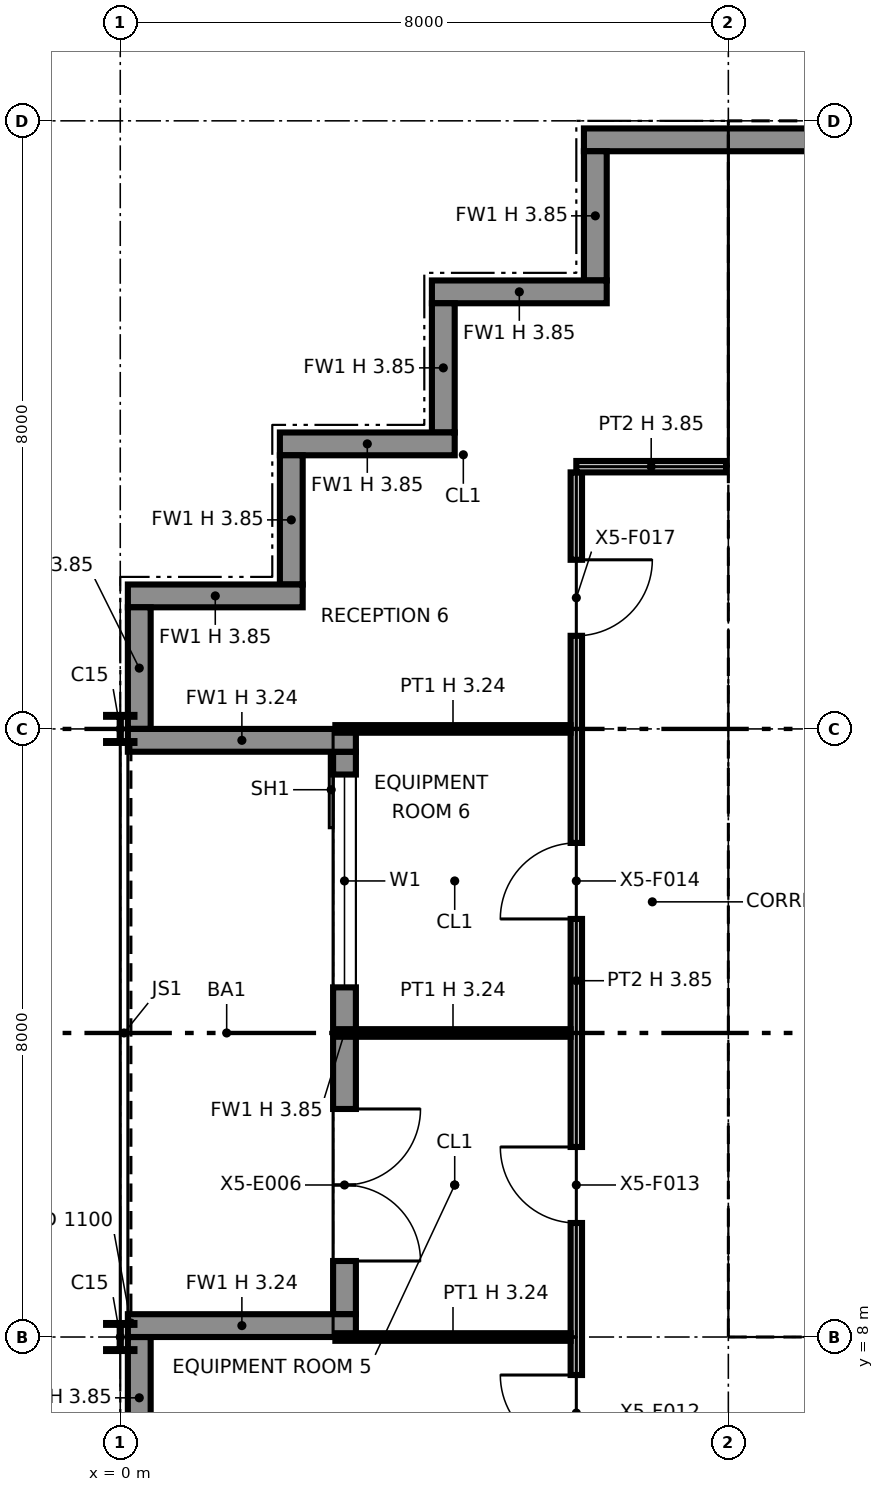
"""IFC4 building model, lengths in metres.
Left out: names, types, materials, properties, quantities, classifications, styles, units other than length and angle.
Written with IfcOpenShell. Run it as: python <this file> out.ifc"""

import sys

from ifc_helpers import new_model, si_unit, direction, frame, frame_2d, origin, origin_2d, place, context, subcontext, project, spatial, polyline, rectangle, i_section, outline, extrude, element, fill, save


model = new_model("IFC4")
c1 = context("Model", 3, precision=1e-05, world=origin(), true_north=direction((0.0, 1.0)))
c2 = subcontext(c1, "Body", "Model", "MODEL_VIEW")
j1 = project(units=[si_unit("LENGTHUNIT", "METRE"), si_unit("PLANEANGLEUNIT", "RADIAN")], contexts=[c1])
p1 = place(None, origin())
s1 = spatial("IfcSite", under=j1, at=p1, CompositionType="ELEMENT")
p2 = place(p1, origin())
s2 = spatial("IfcBuilding", under=s1, at=p2, CompositionType="ELEMENT")
p3 = place(p2, frame((0.0, 0.0, 283.0)))
s3 = spatial("IfcBuildingStorey", under=s2, at=p3, CompositionType="ELEMENT", Elevation=283.0)
for number, where, z_axis, x_axis in (
    (1, (0.0, 8.0, 0.0), (0.0, 0.0, 1.0), (1.0, 0.0, 0.0)),
    (2, (0.0, 16.0, 0.0), (0.0, 0.0, 1.0), (1.0, 0.0, 0.0)),
):
    element("IfcColumn", number, at=place(p3, frame(where, z_axis=z_axis, x_axis=x_axis)), inside=s3, PredefinedType="COLUMN", context=c2, shape_type="SweptSolid", body=[
        extrude(i_section(OverallWidth=0.373, OverallDepth=0.368, WebThickness=0.015, FlangeThickness=0.024, at=origin_2d()), origin(), (0.0, 0.0, 1.0), 3.85),
    ])
for number, where, z_axis, x_axis in (
    (3, (8.0, 8.0, 0.0), (0.0, 0.0, 1.0), (1.0, 0.0, 0.0)),
    (4, (8.0, 16.0, 0.0), (0.0, 0.0, 1.0), (1.0, 0.0, 0.0)),
):
    element("IfcColumn", number, at=place(p3, frame(where, z_axis=z_axis, x_axis=x_axis)), inside=s3, PredefinedType="COLUMN", context=c2, shape_type="SweptSolid", body=[
        extrude(i_section(OverallWidth=0.257, OverallDepth=0.363, WebThickness=0.013, FlangeThickness=0.022, at=origin_2d()), origin(), (0.0, 0.0, 1.0), 3.85),
    ])
p4 = place(p3, frame((8.0, 24.0, 0.0), z_axis=(0.0, 0.0, 1.0), x_axis=(1.0, 0.0, 0.0)))
e5 = element("IfcColumn", 5, at=p4, inside=s3, PredefinedType="COLUMN", context=c2, shape_type="SweptSolid", body=[
    extrude(i_section(OverallWidth=0.399, OverallDepth=0.386, WebThickness=0.021, FlangeThickness=0.033, at=origin_2d()), origin(), (0.0, 0.0, 1.0), 3.85),
])
p5 = place(p3, frame((32.0, 23.75, 0.0), z_axis=(0.0, 0.0, 1.0), x_axis=(-1.0, 0.0, 0.0)))
e6 = element("IfcWall", 6, at=p5, inside=s3, PredefinedType="SOLIDWALL", context=c2, shape_type="SweptSolid", body=[
    extrude(rectangle(XDim=25.9, YDim=0.3, at=frame_2d((12.95, 0.0))), origin(), (0.0, 0.0, 1.0), 3.85),
])
p6 = place(p3, frame((6.25, 23.6, 0.0), z_axis=(0.0, 0.0, 1.0), x_axis=(0.0, -1.0, 0.0)))
e7 = element("IfcWall", 7, at=p6, inside=s3, PredefinedType="SOLIDWALL", context=c2, shape_type="SweptSolid", body=[
    extrude(rectangle(XDim=1.7, YDim=0.3, at=frame_2d((0.85, 0.0))), origin(), (0.0, 0.0, 1.0), 3.85),
])
p7 = place(p3, frame((6.4, 21.75, 0.0), z_axis=(0.0, 0.0, 1.0), x_axis=(-1.0, 0.0, 0.0)))
e8 = element("IfcWall", 8, at=p7, inside=s3, PredefinedType="SOLIDWALL", context=c2, shape_type="SweptSolid", body=[
    extrude(rectangle(XDim=2.3, YDim=0.3, at=frame_2d((1.15, 0.0))), origin(), (0.0, 0.0, 1.0), 3.85),
])
p8 = place(p3, frame((4.25, 21.6, 0.0), z_axis=(0.0, 0.0, 1.0), x_axis=(0.0, -1.0, 0.0)))
e9 = element("IfcWall", 9, at=p8, inside=s3, PredefinedType="SOLIDWALL", context=c2, shape_type="SweptSolid", body=[
    extrude(rectangle(XDim=1.7, YDim=0.3, at=frame_2d((0.85, 0.0))), origin(), (0.0, 0.0, 1.0), 3.85),
])
p9 = place(p3, frame((4.4, 19.75, 0.0), z_axis=(0.0, 0.0, 1.0), x_axis=(-1.0, 0.0, 0.0)))
e10 = element("IfcWall", 10, at=p9, inside=s3, PredefinedType="SOLIDWALL", context=c2, shape_type="SweptSolid", body=[
    extrude(rectangle(XDim=2.3, YDim=0.3, at=frame_2d((1.15, 0.0))), origin(), (0.0, 0.0, 1.0), 3.85),
])
p10 = place(p3, frame((2.25, 19.6, 0.0), z_axis=(0.0, 0.0, 1.0), x_axis=(0.0, -1.0, 0.0)))
e11 = element("IfcWall", 11, at=p10, inside=s3, PredefinedType="SOLIDWALL", context=c2, shape_type="SweptSolid", body=[
    extrude(rectangle(XDim=1.7, YDim=0.3, at=frame_2d((0.85, 0.0))), origin(), (0.0, 0.0, 1.0), 3.85),
])
p11 = place(p3, frame((2.4, 17.75, 0.0), z_axis=(0.0, 0.0, 1.0), x_axis=(-1.0, 0.0, 0.0)))
e12 = element("IfcWall", 12, at=p11, inside=s3, PredefinedType="SOLIDWALL", context=c2, shape_type="SweptSolid", body=[
    extrude(rectangle(XDim=2.3, YDim=0.3, at=frame_2d((1.15, 0.0))), origin(), (0.0, 0.0, 1.0), 3.85),
])
p12 = place(p3, frame((0.25, 17.6, 0.0), z_axis=(0.0, 0.0, 1.0), x_axis=(0.0, -1.0, 0.0)))
e13 = element("IfcWall", 13, at=p12, inside=s3, PredefinedType="SOLIDWALL", context=c2, shape_type="SweptSolid", body=[
    extrude(rectangle(XDim=1.6, YDim=0.3, at=frame_2d((0.8, 0.0))), origin(), (0.0, 0.0, 1.0), 3.85),
])
p13 = place(p3, frame((2.95, 15.7, 0.0), z_axis=(0.0, 0.0, 1.0), x_axis=(0.0, -1.0, 0.0)))
e14 = element("IfcWall", 14, at=p13, inside=s3, PredefinedType="SOLIDWALL", context=c2, shape_type="SweptSolid", body=[
    extrude(rectangle(XDim=7.4, YDim=0.3, at=frame_2d((3.7, 0.0))), origin(), (0.0, 0.0, 1.0), 3.85),
])
p14 = place(p13, frame((0.3, 0.0, 0.9)))
e15 = element("IfcOpeningElement", 15, at=p14, cuts=e14, PredefinedType="OPENING", context=c2, shape_type="SweptSolid", body=[
    extrude(rectangle(XDim=2.8, YDim=2.2, at=frame_2d((1.4, 1.1))), frame((0.0, 0.16, 0.0), z_axis=(0.0, -1.0, 0.0), x_axis=(1.0, 0.0, 0.0)), (0.0, 0.0, 1.0), 0.32),
])
p15 = place(p13, frame((4.7, 0.0, 0.0)))
e16 = element("IfcOpeningElement", 16, at=p15, cuts=e14, PredefinedType="OPENING", context=c2, shape_type="SweptSolid", body=[
    extrude(rectangle(XDim=2.0, YDim=2.4, at=frame_2d((1.0, 1.2))), frame((0.0, 0.16, 0.0), z_axis=(0.0, -1.0, 0.0), x_axis=(1.0, 0.0, 0.0)), (0.0, 0.0, 1.0), 0.32),
])
for number, where, z_axis, x_axis in (
    (17, (0.1, 15.85, 0.0), (0.0, 0.0, 1.0), (1.0, 0.0, 0.0)),
    (18, (0.1, 8.15, 0.0), (0.0, 0.0, 1.0), (1.0, 0.0, 0.0)),
):
    element("IfcWall", number, at=place(p3, frame(where, z_axis=z_axis, x_axis=x_axis)), inside=s3, PredefinedType="SOLIDWALL", context=c2, shape_type="SweptSolid", body=[
        extrude(rectangle(XDim=3.0, YDim=0.3, at=frame_2d((1.5, 0.0))), origin(), (0.0, 0.0, 1.0), 3.237),
    ])
p16 = place(p3, frame((0.25, 8.0, 0.0), z_axis=(0.0, 0.0, 1.0), x_axis=(0.0, -1.0, 0.0)))
e19 = element("IfcWall", 19, at=p16, inside=s3, PredefinedType="SOLIDWALL", context=c2, shape_type="SweptSolid", body=[
    extrude(rectangle(XDim=1.6, YDim=0.3, at=frame_2d((0.8, 0.0))), origin(), (0.0, 0.0, 1.0), 3.85),
])
p17 = place(p3, frame((8.65, 8.75, 0.0), z_axis=(0.0, 0.0, 1.0), x_axis=(1.0, 0.0, 0.0)))
e20 = element("IfcWall", 20, at=p17, inside=s3, PredefinedType="PARTITIONING", context=c2, shape_type="SweptSolid", body=[
    extrude(outline(polyline([(0.0, 0.0), (14.7, 0.0), (14.7, 3.85), (7.438, 3.85), (7.437, 3.318), (7.263, 3.318), (7.262, 3.85), (0.0, 3.85), (0.0, 0.0)])), frame((0.0, 0.1, 0.0), z_axis=(0.0, -1.0, 0.0), x_axis=(1.0, 0.0, 0.0)), (0.0, 0.0, 1.0), 0.2),
])
p18 = place(p17, frame((1.3, 0.0, 0.0)))
e21 = element("IfcOpeningElement", 21, at=p18, cuts=e20, PredefinedType="OPENING", context=c2, shape_type="SweptSolid", body=[
    extrude(rectangle(XDim=1.4, YDim=2.1, at=frame_2d((0.7, 1.05))), frame((0.0, 0.11, 0.0), z_axis=(0.0, -1.0, 0.0), x_axis=(1.0, 0.0, 0.0)), (0.0, 0.0, 1.0), 0.22),
])
p19 = place(p17, frame((4.6, 0.0, 0.0)))
e22 = element("IfcOpeningElement", 22, at=p19, cuts=e20, PredefinedType="OPENING", context=c2, shape_type="SweptSolid", body=[
    extrude(rectangle(XDim=1.4, YDim=2.1, at=frame_2d((0.7, 1.05))), frame((0.0, 0.11, 0.0), z_axis=(0.0, -1.0, 0.0), x_axis=(1.0, 0.0, 0.0)), (0.0, 0.0, 1.0), 0.22),
])
p20 = place(p17, frame((10.4, 0.0, 0.0)))
e23 = element("IfcOpeningElement", 23, at=p20, cuts=e20, PredefinedType="OPENING", context=c2, shape_type="SweptSolid", body=[
    extrude(rectangle(XDim=1.2, YDim=2.1, at=frame_2d((0.6, 1.05))), frame((0.0, 0.11, 0.0), z_axis=(0.0, -1.0, 0.0), x_axis=(1.0, 0.0, 0.0)), (0.0, 0.0, 1.0), 0.22),
])
p21 = place(p3, frame((8.75, 8.85, 0.0), z_axis=(0.0, 0.0, 1.0), x_axis=(0.0, 1.0, 0.0)))
e24 = element("IfcWall", 24, at=p21, inside=s3, PredefinedType="PARTITIONING", context=c2, shape_type="SweptSolid", body=[
    extrude(outline(polyline([(0.0, 0.0), (14.3, 0.0), (14.3, 3.85), (10.225, 3.85), (10.224, 3.44), (10.076, 3.44), (10.075, 3.85), (7.238, 3.85), (7.237, 3.318), (7.063, 3.318), (7.062, 3.85), (0.0, 3.85), (0.0, 0.0)])), frame((0.0, 0.1, 0.0), z_axis=(0.0, -1.0, 0.0), x_axis=(1.0, 0.0, 0.0)), (0.0, 0.0, 1.0), 0.2),
])
p22 = place(p21, frame((8.3, 0.0, 0.0)))
e25 = element("IfcOpeningElement", 25, at=p22, cuts=e24, PredefinedType="OPENING", context=c2, shape_type="SweptSolid", body=[
    extrude(rectangle(XDim=1.8, YDim=2.1, at=frame_2d((0.9, 1.05))), frame((0.0, 0.11, 0.0), z_axis=(0.0, -1.0, 0.0), x_axis=(1.0, 0.0, 0.0)), (0.0, 0.0, 1.0), 0.22),
])
p23 = place(p3, frame((8.65, 23.25, 0.0), z_axis=(0.0, 0.0, 1.0), x_axis=(1.0, 0.0, 0.0)))
e26 = element("IfcWall", 26, at=p23, inside=s3, PredefinedType="PARTITIONING", context=c2, shape_type="SweptSolid", body=[
    extrude(outline(polyline([(0.0, 0.0), (14.7, 0.0), (14.7, 3.85), (7.438, 3.85), (7.437, 3.318), (7.263, 3.318), (7.262, 3.85), (0.0, 3.85), (0.0, 0.0)])), frame((0.0, 0.1, 0.0), z_axis=(0.0, -1.0, 0.0), x_axis=(1.0, 0.0, 0.0)), (0.0, 0.0, 1.0), 0.2),
])
p24 = place(p3, frame((8.85, 16.0, 0.0), z_axis=(0.0, 0.0, 1.0), x_axis=(1.0, 0.0, 0.0)))
e27 = element("IfcWall", 27, at=p24, inside=s3, PredefinedType="PARTITIONING", context=c2, shape_type="SweptSolid", body=[
    extrude(rectangle(XDim=6.958, YDim=0.6, at=frame_2d((3.479, 0.0))), origin(), (0.0, 0.0, 1.0), 3.318),
])
p25 = place(p3, frame((8.85, 19.9, 0.0), z_axis=(0.0, 0.0, 1.0), x_axis=(1.0, 0.0, 0.0)))
e28 = element("IfcWall", 28, at=p25, inside=s3, PredefinedType="PARTITIONING", context=c2, shape_type="SweptSolid", body=[
    extrude(outline(polyline([(0.0, 0.0), (14.3, 0.0), (14.3, 3.85), (7.238, 3.85), (7.237, 3.318), (7.063, 3.318), (7.062, 3.85), (0.0, 3.85), (0.0, 0.0)])), frame((0.0, 0.1, 0.0), z_axis=(0.0, -1.0, 0.0), x_axis=(1.0, 0.0, 0.0)), (0.0, 0.0, 1.0), 0.2),
])
p26 = place(p25, frame((2.125, 0.0, 0.0)))
e29 = element("IfcOpeningElement", 29, at=p26, cuts=e28, PredefinedType="OPENING", context=c2, shape_type="SweptSolid", body=[
    extrude(rectangle(XDim=0.9, YDim=2.1, at=frame_2d((0.45, 1.05))), frame((0.0, 0.11, 0.0), z_axis=(0.0, -1.0, 0.0), x_axis=(1.0, 0.0, 0.0)), (0.0, 0.0, 1.0), 0.22),
])
p27 = place(p25, frame((5.65, 0.0, 0.0)))
e30 = element("IfcOpeningElement", 30, at=p27, cuts=e28, PredefinedType="OPENING", context=c2, shape_type="SweptSolid", body=[
    extrude(rectangle(XDim=1.1, YDim=2.1, at=frame_2d((0.55, 1.05))), frame((0.0, 0.11, 0.0), z_axis=(0.0, -1.0, 0.0), x_axis=(1.0, 0.0, 0.0)), (0.0, 0.0, 1.0), 0.22),
])
p28 = place(p25, frame((7.95, 0.0, 0.0)))
e31 = element("IfcOpeningElement", 31, at=p28, cuts=e28, PredefinedType="OPENING", context=c2, shape_type="SweptSolid", body=[
    extrude(rectangle(XDim=1.1, YDim=2.1, at=frame_2d((0.55, 1.05))), frame((0.0, 0.11, 0.0), z_axis=(0.0, -1.0, 0.0), x_axis=(1.0, 0.0, 0.0)), (0.0, 0.0, 1.0), 0.22),
])
p29 = place(p25, frame((10.25, 0.0, 0.0)))
e32 = element("IfcOpeningElement", 32, at=p29, cuts=e28, PredefinedType="OPENING", context=c2, shape_type="SweptSolid", body=[
    extrude(rectangle(XDim=1.1, YDim=2.1, at=frame_2d((0.55, 1.05))), frame((0.0, 0.11, 0.0), z_axis=(0.0, -1.0, 0.0), x_axis=(1.0, 0.0, 0.0)), (0.0, 0.0, 1.0), 0.22),
])
p30 = place(p25, frame((12.625, 0.0, 0.0)))
e33 = element("IfcOpeningElement", 33, at=p30, cuts=e28, PredefinedType="OPENING", context=c2, shape_type="SweptSolid", body=[
    extrude(rectangle(XDim=1.1, YDim=2.1, at=frame_2d((0.55, 1.05))), frame((0.0, 0.11, 0.0), z_axis=(0.0, -1.0, 0.0), x_axis=(1.0, 0.0, 0.0)), (0.0, 0.0, 1.0), 0.22),
])
p31 = place(p3, frame((6.0, 6.0, 0.0), z_axis=(0.0, 0.0, 1.0), x_axis=(0.0, 1.0, 0.0)))
e34 = element("IfcWall", 34, at=p31, inside=s3, PredefinedType="PARTITIONING", context=c2, shape_type="SweptSolid", body=[
    extrude(outline(polyline([(0.0, 0.0), (13.375, 0.0), (13.375, 3.85), (10.3, 3.85), (10.298, 3.238), (9.702, 3.238), (9.7, 3.85), (6.3, 3.85), (6.298, 3.238), (5.702, 3.238), (5.7, 3.85), (2.3, 3.85), (2.298, 3.238), (1.702, 3.238), (1.7, 3.85), (0.0, 3.85), (0.0, 0.0)])), frame((0.0, 0.075, 0.0), z_axis=(0.0, -1.0, 0.0), x_axis=(1.0, 0.0, 0.0)), (0.0, 0.0, 1.0), 0.15),
])
p32 = place(p31, frame((0.5, 0.0, 0.0)))
e35 = element("IfcOpeningElement", 35, at=p32, cuts=e34, PredefinedType="OPENING", context=c2, shape_type="SweptSolid", body=[
    extrude(rectangle(XDim=1.0, YDim=2.1, at=frame_2d((0.5, 1.05))), frame((0.0, 0.085, 0.0), z_axis=(0.0, -1.0, 0.0), x_axis=(1.0, 0.0, 0.0)), (0.0, 0.0, 1.0), 0.17),
])
p33 = place(p31, frame((3.5, 0.0, 0.0)))
e36 = element("IfcOpeningElement", 36, at=p33, cuts=e34, PredefinedType="OPENING", context=c2, shape_type="SweptSolid", body=[
    extrude(rectangle(XDim=1.0, YDim=2.1, at=frame_2d((0.5, 1.05))), frame((0.0, 0.085, 0.0), z_axis=(0.0, -1.0, 0.0), x_axis=(1.0, 0.0, 0.0)), (0.0, 0.0, 1.0), 0.17),
])
p34 = place(p31, frame((7.5, 0.0, 0.0)))
e37 = element("IfcOpeningElement", 37, at=p34, cuts=e34, PredefinedType="OPENING", context=c2, shape_type="SweptSolid", body=[
    extrude(rectangle(XDim=1.0, YDim=2.1, at=frame_2d((0.5, 1.05))), frame((0.0, 0.085, 0.0), z_axis=(0.0, -1.0, 0.0), x_axis=(1.0, 0.0, 0.0)), (0.0, 0.0, 1.0), 0.17),
])
p35 = place(p31, frame((12.225, 0.0, 0.0), z_axis=(0.0, 0.0, 1.0), x_axis=(-1.0, 0.0, 0.0)))
e38 = element("IfcOpeningElement", 38, at=p35, cuts=e34, PredefinedType="OPENING", context=c2, shape_type="SweptSolid", body=[
    extrude(rectangle(XDim=1.0, YDim=2.1, at=frame_2d((0.5, 1.05))), frame((0.0, 0.085, 0.0), z_axis=(0.0, -1.0, 0.0), x_axis=(1.0, 0.0, 0.0)), (0.0, 0.0, 1.0), 0.17),
])
for number, where, z_axis, x_axis in (
    (39, (2.83, 8.0, 0.0), (0.0, 0.0, 1.0), (1.0, 0.0, 0.0)),
    (40, (2.83, 12.0, 0.0), (0.0, 0.0, 1.0), (1.0, 0.0, 0.0)),
    (41, (2.83, 16.0, 0.0), (0.0, 0.0, 1.0), (1.0, 0.0, 0.0)),
):
    element("IfcWall", number, at=place(p3, frame(where, z_axis=z_axis, x_axis=x_axis)), inside=s3, PredefinedType="PARTITIONING", context=c2, shape_type="SweptSolid", body=[
        extrude(rectangle(XDim=3.095, YDim=0.1, at=frame_2d((1.547, 0.0))), origin(), (0.0, 0.0, 1.0), 3.238),
    ])
p36 = place(p3, frame((6.0, 19.45, 0.0), z_axis=(0.0, 0.0, 1.0), x_axis=(1.0, 0.0, 0.0)))
e42 = element("IfcWall", 42, at=p36, inside=s3, PredefinedType="PARTITIONING", context=c2, shape_type="SweptSolid", body=[
    extrude(rectangle(XDim=1.97, YDim=0.15, at=frame_2d((0.985, 0.0))), origin(), (0.0, 0.0, 1.0), 3.85),
])
p37 = place(p14, origin())
e43 = element("IfcWindow", 43, at=p37, inside=s3, PartitioningType="SINGLE_PANEL", PredefinedType="WINDOW", context=c2, shape_type="SweptSolid", body=[
    extrude(rectangle(XDim=2.8, YDim=2.2, at=frame_2d((1.4, 1.1))), frame((0.0, 0.03, 0.0), z_axis=(0.0, -1.0, 0.0), x_axis=(1.0, 0.0, 0.0)), (0.0, 0.0, 1.0), 0.06),
])
fill(e15, e43)
p38 = place(p15, origin())
e44 = element("IfcDoor", 44, at=p38, inside=s3, OperationType="DOUBLE_DOOR_SINGLE_SWING", PredefinedType="DOOR", context=c2, shape_type="SweptSolid", body=[
    extrude(rectangle(XDim=2.0, YDim=2.4, at=frame_2d((1.0, 1.2))), frame((0.0, 0.025, 0.0), z_axis=(0.0, -1.0, 0.0), x_axis=(1.0, 0.0, 0.0)), (0.0, 0.0, 1.0), 0.05),
])
fill(e16, e44)
p39 = place(p22, origin())
e45 = element("IfcDoor", 45, at=p39, inside=s3, OperationType="DOUBLE_DOOR_SINGLE_SWING", PredefinedType="NOTDEFINED", context=c2, shape_type="SweptSolid", body=[
    extrude(rectangle(XDim=1.8, YDim=2.1, at=frame_2d((0.9, 1.05))), frame((0.0, 0.025, 0.0), z_axis=(0.0, -1.0, 0.0), x_axis=(1.0, 0.0, 0.0)), (0.0, 0.0, 1.0), 0.05),
])
fill(e25, e45)
p40 = place(p32, origin())
e46 = element("IfcDoor", 46, at=p40, inside=s3, OperationType="SINGLE_SWING_RIGHT", PredefinedType="DOOR", context=c2, shape_type="SweptSolid", body=[
    extrude(rectangle(XDim=1.0, YDim=2.1, at=frame_2d((0.5, 1.05))), frame((0.0, 0.025, 0.0), z_axis=(0.0, -1.0, 0.0), x_axis=(1.0, 0.0, 0.0)), (0.0, 0.0, 1.0), 0.05),
])
fill(e35, e46)
p41 = place(p33, origin())
e47 = element("IfcDoor", 47, at=p41, inside=s3, OperationType="SINGLE_SWING_RIGHT", PredefinedType="DOOR", context=c2, shape_type="SweptSolid", body=[
    extrude(rectangle(XDim=1.0, YDim=2.1, at=frame_2d((0.5, 1.05))), frame((0.0, 0.025, 0.0), z_axis=(0.0, -1.0, 0.0), x_axis=(1.0, 0.0, 0.0)), (0.0, 0.0, 1.0), 0.05),
])
fill(e36, e47)
p42 = place(p34, origin())
e48 = element("IfcDoor", 48, at=p42, inside=s3, OperationType="SINGLE_SWING_LEFT", PredefinedType="DOOR", context=c2, shape_type="SweptSolid", body=[
    extrude(rectangle(XDim=1.0, YDim=2.1, at=frame_2d((0.5, 1.05))), frame((0.0, 0.025, 0.0), z_axis=(0.0, -1.0, 0.0), x_axis=(1.0, 0.0, 0.0)), (0.0, 0.0, 1.0), 0.05),
])
fill(e37, e48)
p43 = place(p35, origin())
e49 = element("IfcDoor", 49, at=p43, inside=s3, OperationType="SINGLE_SWING_LEFT", PredefinedType="DOOR", context=c2, shape_type="SweptSolid", body=[
    extrude(rectangle(XDim=1.0, YDim=2.1, at=frame_2d((0.5, 1.05))), frame((0.0, 0.025, 0.0), z_axis=(0.0, -1.0, 0.0), x_axis=(1.0, 0.0, 0.0)), (0.0, 0.0, 1.0), 0.05),
])
fill(e38, e49)
save(model, sys.argv[1])
